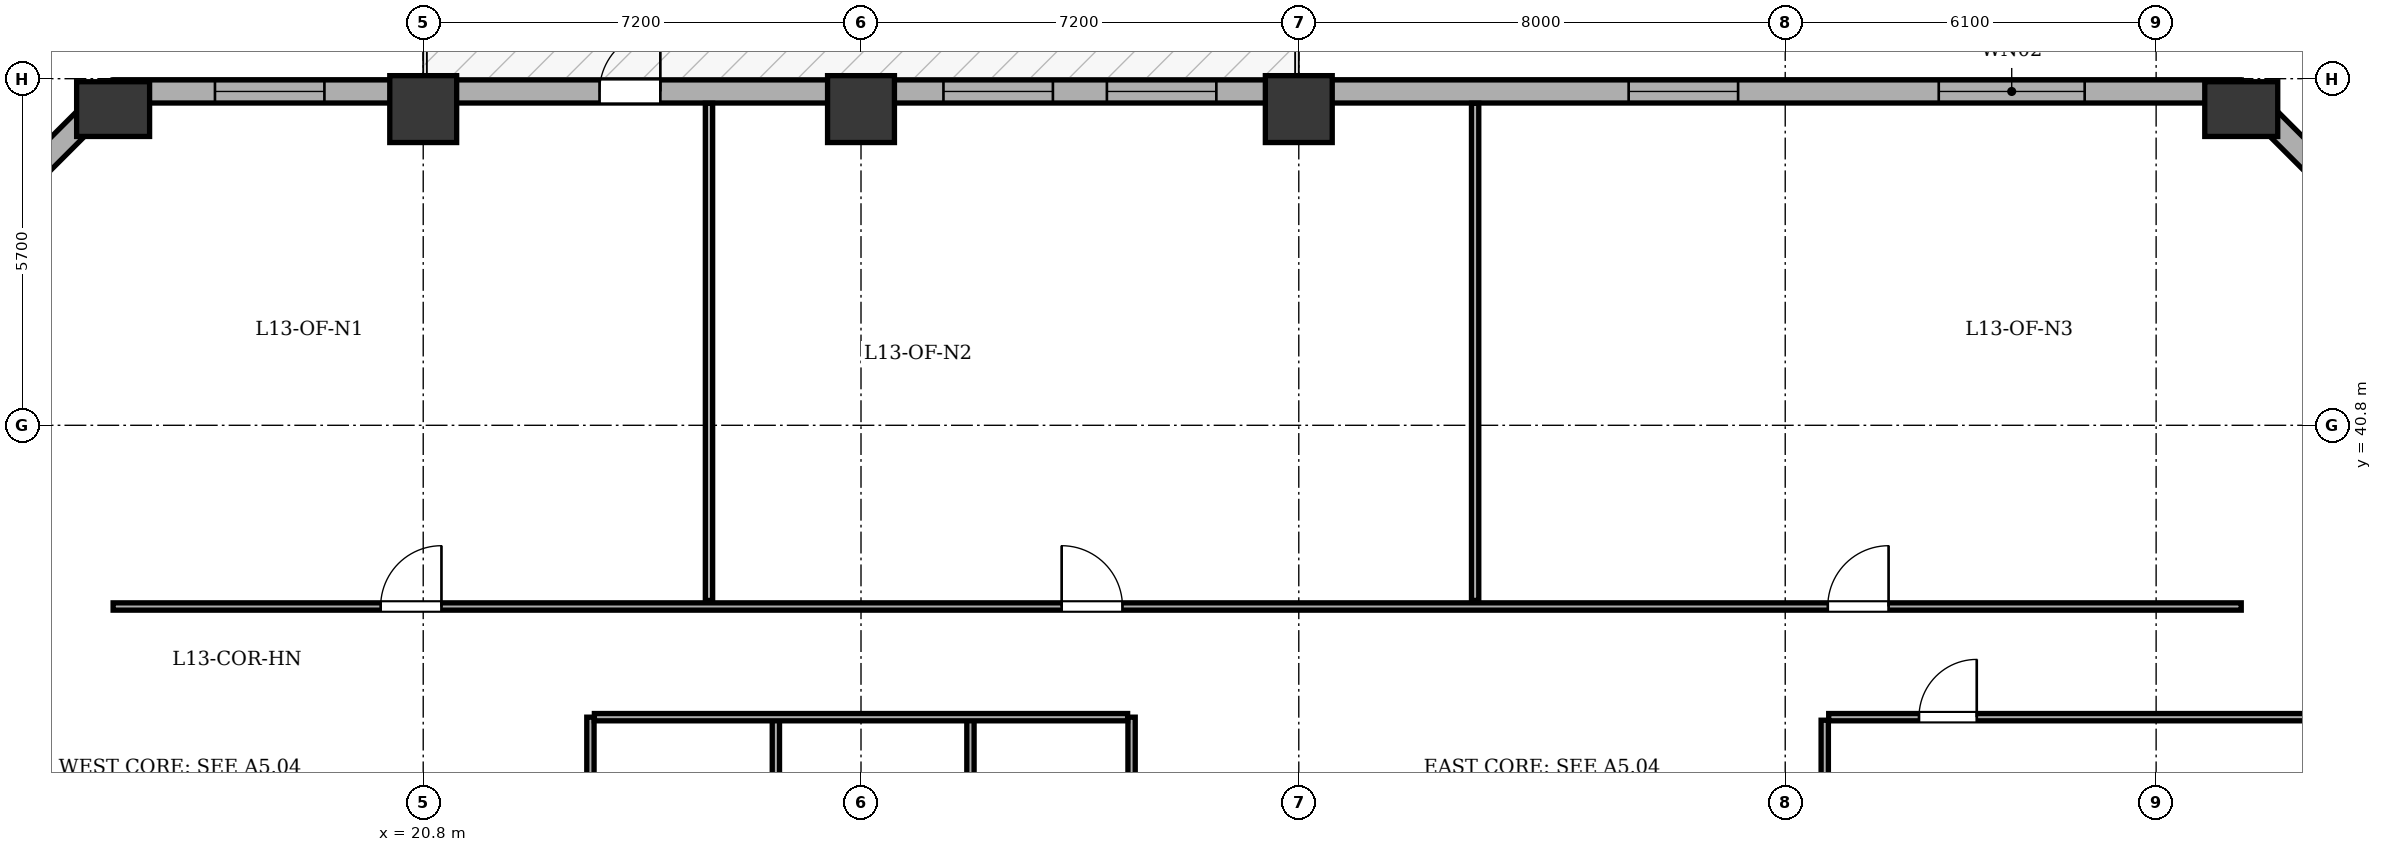
"""IFC4 building model, lengths in metres.
Left out: names, types, materials, properties, quantities, classifications, styles, units other than length and angle.
Written with IfcOpenShell. Run it as: python <this file> out.ifc"""

import sys

from ifc_helpers import new_model, si_unit, direction, frame, frame_2d, origin, origin_2d, place, context, subcontext, project, spatial, rectangle, extrude, element, fill, save


model = new_model("IFC4")
c1 = context("Model", 3, precision=1e-05, world=origin(), true_north=direction((0.0, 1.0)))
c2 = subcontext(c1, "Body", "Model", "MODEL_VIEW")
j1 = project(units=[si_unit("LENGTHUNIT", "METRE"), si_unit("PLANEANGLEUNIT", "RADIAN")], contexts=[c1])
p1 = place(None, origin())
s1 = spatial("IfcSite", under=j1, at=p1, CompositionType="ELEMENT")
p2 = place(p1, origin())
s2 = spatial("IfcBuilding", under=s1, at=p2, CompositionType="ELEMENT")
p3 = place(p2, frame((0.0, 0.0, 55.5)))
s3 = spatial("IfcBuildingStorey", under=s2, at=p3, CompositionType="ELEMENT", Elevation=55.5)
p4 = place(p3, frame((15.7, 46.0, 0.0), z_axis=(0.0, 0.0, 1.0), x_axis=(1.0, 0.0, 0.0)))
e1 = element("IfcColumn", 1, at=p4, inside=s3, PredefinedType="COLUMN", context=c2, shape_type="SweptSolid", body=[
    extrude(rectangle(XDim=0.9, YDim=1.2, at=origin_2d()), origin(), (0.0, 0.0, 1.0), 3.9),
])
for number, where, z_axis, x_axis in (
    (2, (20.8, 46.0, 0.0), (0.0, 0.0, 1.0), (1.0, 0.0, 0.0)),
    (3, (28.0, 46.0, 0.0), (0.0, 0.0, 1.0), (1.0, 0.0, 0.0)),
    (4, (35.2, 46.0, 0.0), (0.0, 0.0, 1.0), (1.0, 0.0, 0.0)),
):
    element("IfcColumn", number, at=place(p3, frame(where, z_axis=z_axis, x_axis=x_axis)), inside=s3, PredefinedType="COLUMN", context=c2, shape_type="SweptSolid", body=[
        extrude(rectangle(XDim=1.1, YDim=1.1, at=origin_2d()), origin(), (0.0, 0.0, 1.0), 3.9),
    ])
p5 = place(p3, frame((50.7, 46.0, 0.0), z_axis=(0.0, 0.0, 1.0), x_axis=(1.0, 0.0, 0.0)))
e5 = element("IfcColumn", 5, at=p5, inside=s3, PredefinedType="COLUMN", context=c2, shape_type="SweptSolid", body=[
    extrude(rectangle(XDim=0.9, YDim=1.2, at=origin_2d()), origin(), (0.0, 0.0, 1.0), 3.9),
])
p6 = place(p3, frame((10.91, 41.5, 0.0), z_axis=(0.0, 0.0, 1.0), x_axis=(0.707106781187, 0.707106781187, 0.0)))
e6 = element("IfcWall", 6, at=p6, inside=s3, PredefinedType="STANDARD", context=c2, shape_type="SweptSolid", body=[
    extrude(rectangle(XDim=6.774, YDim=0.38, at=frame_2d((3.387, 0.0))), origin(), (0.0, 0.0, 1.0), 3.135),
])
p7 = place(p6, frame((2.687, 0.0, 0.8)))
e7 = element("IfcOpeningElement", 7, at=p7, cuts=e6, PredefinedType="OPENING", context=c2, shape_type="SweptSolid", body=[
    extrude(rectangle(XDim=1.4, YDim=1.65, at=frame_2d((0.7, 0.825))), frame((0.0, 0.2, 0.0), z_axis=(0.0, -1.0, 0.0), x_axis=(1.0, 0.0, 0.0)), (0.0, 0.0, 1.0), 0.4),
])
p8 = place(p3, frame((15.7, 46.29, 0.0), z_axis=(0.0, 0.0, 1.0), x_axis=(1.0, 0.0, 0.0)))
e8 = element("IfcWall", 8, at=p8, inside=s3, PredefinedType="STANDARD", context=c2, shape_type="SweptSolid", body=[
    extrude(rectangle(XDim=35.0, YDim=0.38, at=frame_2d((17.5, 0.0))), origin(), (0.0, 0.0, 1.0), 3.135),
])
p9 = place(p8, frame((8.0, 0.0, 0.0)))
e9 = element("IfcOpeningElement", 9, at=p9, cuts=e8, PredefinedType="OPENING", context=c2, shape_type="SweptSolid", body=[
    extrude(rectangle(XDim=1.0, YDim=2.02, at=frame_2d((0.5, 1.01))), frame((0.0, 0.2, 0.0), z_axis=(0.0, -1.0, 0.0), x_axis=(1.0, 0.0, 0.0)), (0.0, 0.0, 1.0), 0.4),
])
p10 = place(p8, frame((1.675, 0.0, 0.8)))
e10 = element("IfcOpeningElement", 10, at=p10, cuts=e8, PredefinedType="OPENING", context=c2, shape_type="SweptSolid", body=[
    extrude(rectangle(XDim=1.8, YDim=1.9, at=frame_2d((0.9, 0.95))), frame((0.0, 0.2, 0.0), z_axis=(0.0, -1.0, 0.0), x_axis=(1.0, 0.0, 0.0)), (0.0, 0.0, 1.0), 0.4),
])
p11 = place(p8, frame((13.656, 0.0, 0.8)))
e11 = element("IfcOpeningElement", 11, at=p11, cuts=e8, PredefinedType="OPENING", context=c2, shape_type="SweptSolid", body=[
    extrude(rectangle(XDim=1.8, YDim=1.9, at=frame_2d((0.9, 0.95))), frame((0.0, 0.2, 0.0), z_axis=(0.0, -1.0, 0.0), x_axis=(1.0, 0.0, 0.0)), (0.0, 0.0, 1.0), 0.4),
])
p12 = place(p8, frame((16.344, 0.0, 0.8)))
e12 = element("IfcOpeningElement", 12, at=p12, cuts=e8, PredefinedType="OPENING", context=c2, shape_type="SweptSolid", body=[
    extrude(rectangle(XDim=1.8, YDim=1.9, at=frame_2d((0.9, 0.95))), frame((0.0, 0.2, 0.0), z_axis=(0.0, -1.0, 0.0), x_axis=(1.0, 0.0, 0.0)), (0.0, 0.0, 1.0), 0.4),
])
p13 = place(p8, frame((24.925, 0.0, 0.8)))
e13 = element("IfcOpeningElement", 13, at=p13, cuts=e8, PredefinedType="OPENING", context=c2, shape_type="SweptSolid", body=[
    extrude(rectangle(XDim=1.8, YDim=1.9, at=frame_2d((0.9, 0.95))), frame((0.0, 0.2, 0.0), z_axis=(0.0, -1.0, 0.0), x_axis=(1.0, 0.0, 0.0)), (0.0, 0.0, 1.0), 0.4),
])
p14 = place(p8, frame((30.025, 0.0, 0.8)))
e14 = element("IfcOpeningElement", 14, at=p14, cuts=e8, PredefinedType="OPENING", context=c2, shape_type="SweptSolid", body=[
    extrude(rectangle(XDim=2.4, YDim=1.9, at=frame_2d((1.2, 0.95))), frame((0.0, 0.2, 0.0), z_axis=(0.0, -1.0, 0.0), x_axis=(1.0, 0.0, 0.0)), (0.0, 0.0, 1.0), 0.4),
])
p15 = place(p3, frame((50.7, 46.29, 0.0), z_axis=(0.0, 0.0, 1.0), x_axis=(0.707106781187, -0.707106781187, 0.0)))
e15 = element("IfcWall", 15, at=p15, inside=s3, PredefinedType="STANDARD", context=c2, shape_type="SweptSolid", body=[
    extrude(rectangle(XDim=6.774, YDim=0.38, at=frame_2d((3.387, 0.0))), origin(), (0.0, 0.0, 1.0), 3.135),
])
p16 = place(p15, frame((2.687, 0.0, 0.8)))
e16 = element("IfcOpeningElement", 16, at=p16, cuts=e15, PredefinedType="OPENING", context=c2, shape_type="SweptSolid", body=[
    extrude(rectangle(XDim=1.4, YDim=1.65, at=frame_2d((0.7, 0.825))), frame((0.0, 0.2, 0.0), z_axis=(0.0, -1.0, 0.0), x_axis=(1.0, 0.0, 0.0)), (0.0, 0.0, 1.0), 0.4),
])
for number, where, z_axis, x_axis in (
    (17, (23.55, 24.715, 0.0), (0.0, 0.0, 1.0), (0.0, 1.0, 0.0)),
    (18, (32.45, 24.715, 0.0), (0.0, 0.0, 1.0), (0.0, 1.0, 0.0)),
    (19, (26.6, 24.715, 0.0), (0.0, 0.0, 1.0), (0.0, 1.0, 0.0)),
):
    element("IfcWall", number, at=place(p3, frame(where, z_axis=z_axis, x_axis=x_axis)), inside=s3, PredefinedType="PARTITIONING", context=c2, shape_type="SweptSolid", body=[
        extrude(rectangle(XDim=11.285, YDim=0.12, at=frame_2d((5.643, 0.0))), origin(), (0.0, 0.0, 1.0), 3.6),
    ])
p17 = place(p3, frame((29.8, 24.715, 0.0), z_axis=(0.0, 0.0, 1.0), x_axis=(0.0, 1.0, 0.0)))
e20 = element("IfcWall", 20, at=p17, inside=s3, PredefinedType="PARTITIONING", context=c2, shape_type="SweptSolid", body=[
    extrude(rectangle(XDim=11.285, YDim=0.12, at=frame_2d((5.643, 0.0))), origin(), (0.0, 0.0, 1.0), 3.135),
])
p18 = place(p3, frame((23.615, 36.0, 0.0), z_axis=(0.0, 0.0, 1.0), x_axis=(1.0, 0.0, 0.0)))
e21 = element("IfcWall", 21, at=p18, inside=s3, PredefinedType="PARTITIONING", context=c2, shape_type="SweptSolid", body=[
    extrude(rectangle(XDim=8.77, YDim=0.12, at=frame_2d((4.385, 0.0))), origin(), (0.0, 0.0, 1.0), 3.6),
])
p19 = place(p3, frame((15.7, 37.82, 0.0), z_axis=(0.0, 0.0, 1.0), x_axis=(1.0, 0.0, 0.0)))
e22 = element("IfcWall", 22, at=p19, inside=s3, PredefinedType="PARTITIONING", context=c2, shape_type="SweptSolid", body=[
    extrude(rectangle(XDim=35.0, YDim=0.12, at=frame_2d((17.5, 0.0))), origin(), (0.0, 0.0, 1.0), 3.6),
])
p20 = place(p19, frame((4.4, 0.0, 0.0)))
e23 = element("IfcOpeningElement", 23, at=p20, cuts=e22, PredefinedType="OPENING", context=c2, shape_type="SweptSolid", body=[
    extrude(rectangle(XDim=1.0, YDim=2.1, at=frame_2d((0.5, 1.05))), frame((0.0, 0.07, 0.0), z_axis=(0.0, -1.0, 0.0), x_axis=(1.0, 0.0, 0.0)), (0.0, 0.0, 1.0), 0.14),
])
p21 = place(p19, frame((15.6, 0.0, 0.0)))
e24 = element("IfcOpeningElement", 24, at=p21, cuts=e22, PredefinedType="OPENING", context=c2, shape_type="SweptSolid", body=[
    extrude(rectangle(XDim=1.0, YDim=2.1, at=frame_2d((0.5, 1.05))), frame((0.0, 0.07, 0.0), z_axis=(0.0, -1.0, 0.0), x_axis=(1.0, 0.0, 0.0)), (0.0, 0.0, 1.0), 0.14),
])
p22 = place(p19, frame((28.2, 0.0, 0.0)))
e25 = element("IfcOpeningElement", 25, at=p22, cuts=e22, PredefinedType="OPENING", context=c2, shape_type="SweptSolid", body=[
    extrude(rectangle(XDim=1.0, YDim=2.1, at=frame_2d((0.5, 1.05))), frame((0.0, 0.07, 0.0), z_axis=(0.0, -1.0, 0.0), x_axis=(1.0, 0.0, 0.0)), (0.0, 0.0, 1.0), 0.14),
])
for number, where, z_axis, x_axis in (
    (26, (25.5, 37.92, 0.0), (0.0, 0.0, 1.0), (0.0, 1.0, 0.0)),
    (27, (38.1, 37.92, 0.0), (0.0, 0.0, 1.0), (0.0, 1.0, 0.0)),
):
    element("IfcWall", number, at=place(p3, frame(where, z_axis=z_axis, x_axis=x_axis)), inside=s3, PredefinedType="PARTITIONING", context=c2, shape_type="SweptSolid", body=[
        extrude(rectangle(XDim=8.175, YDim=0.12, at=frame_2d((4.087, 0.0))), origin(), (0.0, 0.0, 1.0), 3.6),
    ])
p23 = place(p3, frame((43.85, 18.45, 0.0), z_axis=(0.0, 0.0, 1.0), x_axis=(0.0, 1.0, 0.0)))
e28 = element("IfcWall", 28, at=p23, inside=s3, PredefinedType="PARTITIONING", context=c2, shape_type="SweptSolid", body=[
    extrude(rectangle(XDim=17.5, YDim=0.12, at=frame_2d((8.75, 0.0))), origin(), (0.0, 0.0, 1.0), 3.6),
])
p24 = place(p3, frame((43.915, 36.0, 0.0), z_axis=(0.0, 0.0, 1.0), x_axis=(1.0, 0.0, 0.0)))
e29 = element("IfcWall", 29, at=p24, inside=s3, PredefinedType="PARTITIONING", context=c2, shape_type="SweptSolid", body=[
    extrude(rectangle(XDim=11.38, YDim=0.12, at=frame_2d((5.69, 0.0))), origin(), (0.0, 0.0, 1.0), 3.6),
])
p25 = place(p24, frame((1.485, 0.0, 0.0)))
e30 = element("IfcOpeningElement", 30, at=p25, cuts=e29, PredefinedType="OPENING", context=c2, shape_type="SweptSolid", body=[
    extrude(rectangle(XDim=0.95, YDim=2.1, at=frame_2d((0.475, 1.05))), frame((0.0, 0.07, 0.0), z_axis=(0.0, -1.0, 0.0), x_axis=(1.0, 0.0, 0.0)), (0.0, 0.0, 1.0), 0.14),
])
p26 = place(p9, origin())
e31 = element("IfcDoor", 31, at=p26, inside=s3, OperationType="SINGLE_SWING_RIGHT", PredefinedType="DOOR", context=c2, shape_type="SweptSolid", body=[
    extrude(rectangle(XDim=1.0, YDim=2.02, at=frame_2d((0.5, 1.01))), frame((0.0, 0.025, 0.0), z_axis=(0.0, -1.0, 0.0), x_axis=(1.0, 0.0, 0.0)), (0.0, 0.0, 1.0), 0.05),
])
fill(e9, e31)
p27 = place(p10, origin())
e32 = element("IfcWindow", 32, at=p27, inside=s3, PartitioningType="SINGLE_PANEL", PredefinedType="WINDOW", context=c2, shape_type="SweptSolid", body=[
    extrude(rectangle(XDim=1.8, YDim=1.9, at=frame_2d((0.9, 0.95))), frame((0.0, -0.01, 0.0), z_axis=(0.0, -1.0, 0.0), x_axis=(1.0, 0.0, 0.0)), (0.0, 0.0, 1.0), 0.06),
])
fill(e10, e32)
p28 = place(p11, origin())
e33 = element("IfcWindow", 33, at=p28, inside=s3, PartitioningType="SINGLE_PANEL", PredefinedType="WINDOW", context=c2, shape_type="SweptSolid", body=[
    extrude(rectangle(XDim=1.8, YDim=1.9, at=frame_2d((0.9, 0.95))), frame((0.0, -0.01, 0.0), z_axis=(0.0, -1.0, 0.0), x_axis=(1.0, 0.0, 0.0)), (0.0, 0.0, 1.0), 0.06),
])
fill(e11, e33)
p29 = place(p12, origin())
e34 = element("IfcWindow", 34, at=p29, inside=s3, PartitioningType="SINGLE_PANEL", PredefinedType="WINDOW", context=c2, shape_type="SweptSolid", body=[
    extrude(rectangle(XDim=1.8, YDim=1.9, at=frame_2d((0.9, 0.95))), frame((0.0, -0.01, 0.0), z_axis=(0.0, -1.0, 0.0), x_axis=(1.0, 0.0, 0.0)), (0.0, 0.0, 1.0), 0.06),
])
fill(e12, e34)
p30 = place(p13, origin())
e35 = element("IfcWindow", 35, at=p30, inside=s3, PartitioningType="SINGLE_PANEL", PredefinedType="WINDOW", context=c2, shape_type="SweptSolid", body=[
    extrude(rectangle(XDim=1.8, YDim=1.9, at=frame_2d((0.9, 0.95))), frame((0.0, -0.01, 0.0), z_axis=(0.0, -1.0, 0.0), x_axis=(1.0, 0.0, 0.0)), (0.0, 0.0, 1.0), 0.06),
])
fill(e13, e35)
p31 = place(p14, origin())
e36 = element("IfcWindow", 36, at=p31, inside=s3, PartitioningType="SINGLE_PANEL", PredefinedType="WINDOW", context=c2, shape_type="SweptSolid", body=[
    extrude(rectangle(XDim=2.4, YDim=1.9, at=frame_2d((1.2, 0.95))), frame((0.0, -0.01, 0.0), z_axis=(0.0, -1.0, 0.0), x_axis=(1.0, 0.0, 0.0)), (0.0, 0.0, 1.0), 0.06),
])
fill(e14, e36)
p32 = place(p20, origin())
e37 = element("IfcDoor", 37, at=p32, inside=s3, OperationType="SINGLE_SWING_RIGHT", PredefinedType="DOOR", context=c2, shape_type="SweptSolid", body=[
    extrude(rectangle(XDim=1.0, YDim=2.1, at=frame_2d((0.5, 1.05))), frame((0.0, 0.025, 0.0), z_axis=(0.0, -1.0, 0.0), x_axis=(1.0, 0.0, 0.0)), (0.0, 0.0, 1.0), 0.05),
])
fill(e23, e37)
p33 = place(p21, origin())
e38 = element("IfcDoor", 38, at=p33, inside=s3, OperationType="SINGLE_SWING_LEFT", PredefinedType="DOOR", context=c2, shape_type="SweptSolid", body=[
    extrude(rectangle(XDim=1.0, YDim=2.1, at=frame_2d((0.5, 1.05))), frame((0.0, 0.025, 0.0), z_axis=(0.0, -1.0, 0.0), x_axis=(1.0, 0.0, 0.0)), (0.0, 0.0, 1.0), 0.05),
])
fill(e24, e38)
p34 = place(p22, origin())
e39 = element("IfcDoor", 39, at=p34, inside=s3, OperationType="SINGLE_SWING_RIGHT", PredefinedType="DOOR", context=c2, shape_type="SweptSolid", body=[
    extrude(rectangle(XDim=1.0, YDim=2.1, at=frame_2d((0.5, 1.05))), frame((0.0, 0.025, 0.0), z_axis=(0.0, -1.0, 0.0), x_axis=(1.0, 0.0, 0.0)), (0.0, 0.0, 1.0), 0.05),
])
fill(e25, e39)
p35 = place(p25, origin())
e40 = element("IfcDoor", 40, at=p35, inside=s3, OperationType="SINGLE_SWING_RIGHT", PredefinedType="DOOR", context=c2, shape_type="SweptSolid", body=[
    extrude(rectangle(XDim=0.95, YDim=2.1, at=frame_2d((0.475, 1.05))), frame((0.0, 0.025, 0.0), z_axis=(0.0, -1.0, 0.0), x_axis=(1.0, 0.0, 0.0)), (0.0, 0.0, 1.0), 0.05),
])
fill(e30, e40)
save(model, sys.argv[1])
